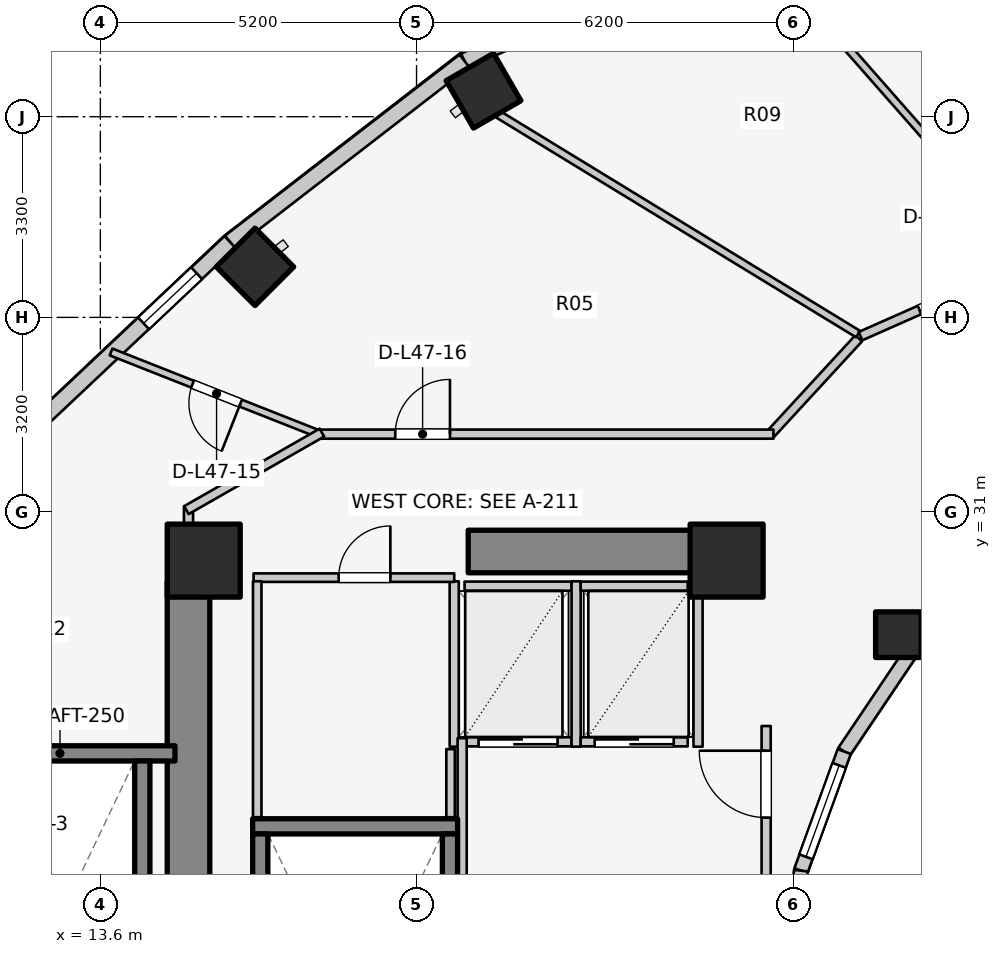
"""IFC4 building model, lengths in metres.
Left out: names, types, materials, properties, quantities, classifications, styles, units other than length and angle.
Written with IfcOpenShell. Run it as: python <this file> out.ifc"""

import sys

from ifc_helpers import new_model, si_unit, direction, frame, frame_2d, origin, origin_2d, place, context, subcontext, project, spatial, rectangle, extrude, element, fill, save


model = new_model("IFC4")
c1 = context("Model", 3, precision=1e-05, world=origin(), true_north=direction((0.0, 1.0)))
c2 = subcontext(c1, "Body", "Model", "MODEL_VIEW")
j1 = project(units=[si_unit("LENGTHUNIT", "METRE"), si_unit("PLANEANGLEUNIT", "RADIAN")], contexts=[c1])
p1 = place(None, origin())
s1 = spatial("IfcSite", under=j1, at=p1, CompositionType="ELEMENT")
p2 = place(p1, origin())
s2 = spatial("IfcBuilding", under=s1, at=p2, CompositionType="ELEMENT")
p3 = place(p2, frame((0.0, 0.0, 156.0)))
s3 = spatial("IfcBuildingStorey", under=s2, at=p3, CompositionType="ELEMENT", Elevation=156.0)
p4 = place(p3, frame((15.05, 17.05, 0.0), z_axis=(0.0, 0.0, 1.0), x_axis=(0.0, 1.0, 0.0)))
e1 = element("IfcWall", 1, at=p4, inside=s3, PredefinedType="SHEAR", context=c2, shape_type="SweptSolid", body=[
    extrude(rectangle(XDim=12.8, YDim=0.7, at=frame_2d((6.4, 0.0))), origin(), (0.0, 0.0, 1.0), 3.1),
])
p5 = place(p3, frame((19.65, 30.35, 0.0), z_axis=(0.0, 0.0, 1.0), x_axis=(1.0, 0.0, 0.0)))
e2 = element("IfcWall", 2, at=p5, inside=s3, PredefinedType="SHEAR", context=c2, shape_type="SweptSolid", body=[
    extrude(rectangle(XDim=4.5, YDim=0.7, at=frame_2d((2.25, 0.0))), origin(), (0.0, 0.0, 1.0), 3.1),
])
p6 = place(p3, frame((16.105, 25.83, 0.0), z_axis=(0.0, 0.0, 1.0), x_axis=(1.0, 0.0, 0.0)))
e3 = element("IfcWall", 3, at=p6, inside=s3, PredefinedType="SOLIDWALL", context=c2, shape_type="SweptSolid", body=[
    extrude(rectangle(XDim=3.37, YDim=0.25, at=frame_2d((1.685, 0.0))), origin(), (0.0, 0.0, 1.0), 3.1),
])
for number, where, z_axis, x_axis in (
    (4, (16.23, 17.895, 0.0), (0.0, 0.0, 1.0), (0.0, 1.0, 0.0)),
    (5, (19.35, 17.895, 0.0), (0.0, 0.0, 1.0), (0.0, 1.0, 0.0)),
):
    element("IfcWall", number, at=place(p3, frame(where, z_axis=z_axis, x_axis=x_axis)), inside=s3, PredefinedType="SOLIDWALL", context=c2, shape_type="SweptSolid", body=[
        extrude(rectangle(XDim=7.81, YDim=0.25, at=frame_2d((3.905, 0.0))), origin(), (0.0, 0.0, 1.0), 3.1),
    ])
p7 = place(p3, frame((11.045, 27.03, 0.0), z_axis=(0.0, 0.0, 1.0), x_axis=(1.0, 0.0, 0.0)))
e6 = element("IfcWall", 6, at=p7, inside=s3, PredefinedType="SOLIDWALL", context=c2, shape_type="SweptSolid", body=[
    extrude(rectangle(XDim=3.782, YDim=0.25, at=frame_2d((1.891, 0.0))), origin(), (0.0, 0.0, 1.0), 3.1),
])
p8 = place(p3, frame((14.29, 19.095, 0.0), z_axis=(0.0, 0.0, 1.0), x_axis=(0.0, 1.0, 0.0)))
e7 = element("IfcWall", 7, at=p8, inside=s3, PredefinedType="SOLIDWALL", context=c2, shape_type="SweptSolid", body=[
    extrude(rectangle(XDim=7.81, YDim=0.25, at=frame_2d((3.905, 0.0))), origin(), (0.0, 0.0, 1.0), 3.1),
])
for number, where, z_axis, x_axis in (
    (8, (23.9, 30.2, 0.0), (0.0, 0.0, 1.0), (1.0, 0.0, 0.0)),
    (9, (15.3, 30.2, 0.0), (0.0, 0.0, 1.0), (1.0, 0.0, 0.0)),
):
    element("IfcColumn", number, at=place(p3, frame(where, z_axis=z_axis, x_axis=x_axis)), inside=s3, PredefinedType="COLUMN", context=c2, shape_type="SweptSolid", body=[
        extrude(rectangle(XDim=1.2, YDim=1.2, at=origin_2d()), origin(), (0.0, 0.0, 1.0), 3.1),
    ])
p9 = place(p3, frame((19.902, 37.928, 0.0), z_axis=(0.0, 0.0, 1.0), x_axis=(-0.5, 0.866025403784, 0.0)))
e10 = element("IfcColumn", 10, at=p9, inside=s3, PredefinedType="COLUMN", context=c2, shape_type="SweptSolid", body=[
    extrude(rectangle(XDim=0.9, YDim=0.9, at=origin_2d()), origin(), (0.0, 0.0, 1.0), 3.1),
])
p10 = place(p3, frame((26.725, 28.982, 0.0), z_axis=(0.0, 0.0, 1.0), x_axis=(1.0, 0.0, 0.0)))
e11 = element("IfcColumn", 11, at=p10, inside=s3, PredefinedType="COLUMN", context=c2, shape_type="SweptSolid", body=[
    extrude(rectangle(XDim=0.75, YDim=0.75, at=origin_2d()), origin(), (0.0, 0.0, 1.0), 3.1),
])
p11 = place(p3, frame((16.143, 35.031, 0.0), z_axis=(0.0, 0.0, 1.0), x_axis=(-0.707106781187, 0.707106781187, 0.0)))
e12 = element("IfcColumn", 12, at=p11, inside=s3, PredefinedType="COLUMN", context=c2, shape_type="SweptSolid", body=[
    extrude(rectangle(XDim=0.9, YDim=0.9, at=origin_2d()), origin(), (0.0, 0.0, 1.0), 3.1),
])
p12 = place(p3, frame((28.44, 30.032, 0.0), z_axis=(0.0, 0.0, 1.0), x_axis=(-0.752576694707, -0.658504607869, 0.0)))
e13 = element("IfcWall", 13, at=p12, inside=s3, PredefinedType="STANDARD", context=c2, shape_type="SweptSolid", body=[
    extrude(rectangle(XDim=1.959, YDim=0.23, at=frame_2d((0.98, 0.0))), origin(), (0.0, 0.0, 1.0), 2.16),
])
p13 = place(p3, frame((26.965, 28.742, 0.0), z_axis=(0.0, 0.0, 1.0), x_axis=(-0.558197800898, -0.829707909492, 0.0)))
e14 = element("IfcWall", 14, at=p13, inside=s3, PredefinedType="STANDARD", context=c2, shape_type="SweptSolid", body=[
    extrude(rectangle(XDim=2.027, YDim=0.23, at=frame_2d((1.013, 0.0))), origin(), (0.0, 0.0, 1.0), 2.16),
])
p14 = place(p3, frame((25.834, 27.06, 0.0), z_axis=(0.0, 0.0, 1.0), x_axis=(-0.341423187295, -0.93990968033, 0.0)))
e15 = element("IfcWall", 15, at=p14, inside=s3, PredefinedType="STANDARD", context=c2, shape_type="SweptSolid", body=[
    extrude(rectangle(XDim=2.084, YDim=0.23, at=frame_2d((1.042, 0.0))), origin(), (0.0, 0.0, 1.0), 2.84),
])
p15 = place(p14, frame((0.242, 0.0, 0.85)))
e16 = element("IfcOpeningElement", 16, at=p15, cuts=e15, PredefinedType="OPENING", context=c2, shape_type="SweptSolid", body=[
    extrude(rectangle(XDim=1.6, YDim=1.65, at=frame_2d((0.8, 0.825))), frame((0.0, 0.125, 0.0), z_axis=(0.0, -1.0, 0.0), x_axis=(1.0, 0.0, 0.0)), (0.0, 0.0, 1.0), 0.25),
])
p16 = place(p3, frame((25.123, 25.102, 0.0), z_axis=(0.0, 0.0, 1.0), x_axis=(-0.114711713601, -0.993398823617, 0.0)))
e17 = element("IfcWall", 17, at=p16, inside=s3, PredefinedType="STANDARD", context=c2, shape_type="SweptSolid", body=[
    extrude(rectangle(XDim=2.115, YDim=0.23, at=frame_2d((1.058, 0.0))), origin(), (0.0, 0.0, 1.0), 2.84),
])
p17 = place(p3, frame((24.635, 40.685, 0.0), z_axis=(0.0, 0.0, 1.0), x_axis=(-0.912353637112, -0.409403029847, 0.0)))
e18 = element("IfcWall", 18, at=p17, inside=s3, PredefinedType="STANDARD", context=c2, shape_type="SweptSolid", body=[
    extrude(rectangle(XDim=5.533, YDim=0.26, at=frame_2d((2.766, 0.0))), origin(), (0.0, 0.0, 1.0), 2.85),
])
p18 = place(p17, frame((1.566, 0.0, 0.75)))
e19 = element("IfcOpeningElement", 19, at=p18, cuts=e18, PredefinedType="OPENING", context=c2, shape_type="SweptSolid", body=[
    extrude(rectangle(XDim=2.4, YDim=1.7, at=frame_2d((1.2, 0.85))), frame((0.0, 0.14, 0.0), z_axis=(0.0, -1.0, 0.0), x_axis=(1.0, 0.0, 0.0)), (0.0, 0.0, 1.0), 0.28),
])
p19 = place(p3, frame((19.587, 38.419, 0.0), z_axis=(0.0, 0.0, 1.0), x_axis=(-0.791460185804, -0.611220724687, 0.0)))
e20 = element("IfcWall", 20, at=p19, inside=s3, PredefinedType="STANDARD", context=c2, shape_type="SweptSolid", body=[
    extrude(rectangle(XDim=4.872, YDim=0.26, at=frame_2d((2.436, 0.0))), origin(), (0.0, 0.0, 1.0), 2.85),
])
p20 = place(p3, frame((15.731, 35.441, 0.0), z_axis=(0.0, 0.0, 1.0), x_axis=(-0.727667301037, -0.68593024354, 0.0)))
e21 = element("IfcWall", 21, at=p20, inside=s3, PredefinedType="STANDARD", context=c2, shape_type="SweptSolid", body=[
    extrude(rectangle(XDim=4.604, YDim=0.26, at=frame_2d((2.302, 0.0))), origin(), (0.0, 0.0, 1.0), 2.85),
])
p21 = place(p20, frame((0.751, 0.0, 0.75)))
e22 = element("IfcOpeningElement", 22, at=p21, cuts=e21, PredefinedType="OPENING", context=c2, shape_type="SweptSolid", body=[
    extrude(rectangle(XDim=1.2, YDim=1.5, at=frame_2d((0.6, 0.75))), frame((0.0, 0.14, 0.0), z_axis=(0.0, -1.0, 0.0), x_axis=(1.0, 0.0, 0.0)), (0.0, 0.0, 1.0), 0.28),
])
p22 = place(p3, frame((19.59, 27.22, 0.0), z_axis=(0.0, 0.0, 1.0), x_axis=(1.0, 0.0, 0.0)))
e23 = element("IfcWall", 23, at=p22, inside=s3, PredefinedType="SOLIDWALL", context=c2, shape_type="SweptSolid", body=[
    extrude(rectangle(XDim=1.76, YDim=0.15, at=frame_2d((0.88, 0.0))), origin(), (0.0, 0.0, 1.0), 2.855),
])
p23 = place(p22, frame((0.23, 0.0, 0.0)))
e24 = element("IfcOpeningElement", 24, at=p23, cuts=e23, PredefinedType="OPENING", context=c2, shape_type="SweptSolid", body=[
    extrude(rectangle(XDim=1.3, YDim=2.1, at=frame_2d((0.65, 1.05))), frame((0.0, 0.085, 0.0), z_axis=(0.0, -1.0, 0.0), x_axis=(1.0, 0.0, 0.0)), (0.0, 0.0, 1.0), 0.17),
])
p24 = place(p3, frame((19.59, 29.78, 0.0), z_axis=(0.0, 0.0, 1.0), x_axis=(1.0, 0.0, 0.0)))
e25 = element("IfcWall", 25, at=p24, inside=s3, PredefinedType="SOLIDWALL", context=c2, shape_type="SweptSolid", body=[
    extrude(rectangle(XDim=1.76, YDim=0.15, at=frame_2d((0.88, 0.0))), origin(), (0.0, 0.0, 1.0), 2.855),
])
for number, where, z_axis, x_axis in (
    (26, (19.42, 27.14, 0.0), (0.0, 0.0, 1.0), (0.0, 1.0, 0.0)),
    (27, (21.425, 27.14, 0.0), (0.0, 0.0, 1.0), (0.0, 1.0, 0.0)),
):
    element("IfcWall", number, at=place(p3, frame(where, z_axis=z_axis, x_axis=x_axis)), inside=s3, PredefinedType="SOLIDWALL", context=c2, shape_type="SweptSolid", body=[
        extrude(rectangle(XDim=2.72, YDim=0.15, at=frame_2d((1.36, 0.0))), origin(), (0.0, 0.0, 1.0), 2.855),
    ])
p25 = place(p3, frame((21.5, 27.22, 0.0), z_axis=(0.0, 0.0, 1.0), x_axis=(1.0, 0.0, 0.0)))
e28 = element("IfcWall", 28, at=p25, inside=s3, PredefinedType="SOLIDWALL", context=c2, shape_type="SweptSolid", body=[
    extrude(rectangle(XDim=1.76, YDim=0.15, at=frame_2d((0.88, 0.0))), origin(), (0.0, 0.0, 1.0), 2.855),
])
p26 = place(p25, frame((0.23, 0.0, 0.0)))
e29 = element("IfcOpeningElement", 29, at=p26, cuts=e28, PredefinedType="OPENING", context=c2, shape_type="SweptSolid", body=[
    extrude(rectangle(XDim=1.3, YDim=2.1, at=frame_2d((0.65, 1.05))), frame((0.0, 0.085, 0.0), z_axis=(0.0, -1.0, 0.0), x_axis=(1.0, 0.0, 0.0)), (0.0, 0.0, 1.0), 0.17),
])
p27 = place(p3, frame((21.5, 29.78, 0.0), z_axis=(0.0, 0.0, 1.0), x_axis=(1.0, 0.0, 0.0)))
e30 = element("IfcWall", 30, at=p27, inside=s3, PredefinedType="SOLIDWALL", context=c2, shape_type="SweptSolid", body=[
    extrude(rectangle(XDim=1.76, YDim=0.15, at=frame_2d((0.88, 0.0))), origin(), (0.0, 0.0, 1.0), 2.855),
])
p28 = place(p3, frame((23.43, 27.14, 0.0), z_axis=(0.0, 0.0, 1.0), x_axis=(0.0, 1.0, 0.0)))
e31 = element("IfcWall", 31, at=p28, inside=s3, PredefinedType="SOLIDWALL", context=c2, shape_type="SweptSolid", body=[
    extrude(rectangle(XDim=2.72, YDim=0.15, at=frame_2d((1.36, 0.0))), origin(), (0.0, 0.0, 1.0), 2.855),
])
p29 = place(p3, frame((19.55, 24.08, 0.0), z_axis=(0.0, 0.0, 1.0), x_axis=(0.0, 1.0, 0.0)))
e32 = element("IfcWall", 32, at=p29, inside=s3, PredefinedType="PARTITIONING", context=c2, shape_type="SweptSolid", body=[
    extrude(rectangle(XDim=3.2, YDim=0.15, at=frame_2d((1.6, 0.0))), origin(), (0.0, 0.0, 1.0), 2.855),
])
p30 = place(p3, frame((24.55, 24.08, 0.0), z_axis=(0.0, 0.0, 1.0), x_axis=(0.0, 1.0, 0.0)))
e33 = element("IfcWall", 33, at=p30, inside=s3, PredefinedType="PARTITIONING", context=c2, shape_type="SweptSolid", body=[
    extrude(rectangle(XDim=3.4, YDim=0.15, at=frame_2d((1.7, 0.0))), origin(), (0.0, 0.0, 1.0), 2.855),
])
p31 = place(p30, frame((1.894, 0.0, 0.0)))
e34 = element("IfcOpeningElement", 34, at=p31, cuts=e33, PredefinedType="OPENING", context=c2, shape_type="SweptSolid", body=[
    extrude(rectangle(XDim=1.1, YDim=2.1, at=frame_2d((0.55, 1.05))), frame((0.0, 0.085, 0.0), z_axis=(0.0, -1.0, 0.0), x_axis=(1.0, 0.0, 0.0)), (0.0, 0.0, 1.0), 0.17),
])
p32 = place(p3, frame((16.12, 29.92, 0.0), z_axis=(0.0, 0.0, 1.0), x_axis=(1.0, 0.0, 0.0)))
e35 = element("IfcWall", 35, at=p32, inside=s3, PredefinedType="PLUMBINGWALL", context=c2, shape_type="SweptSolid", body=[
    extrude(rectangle(XDim=3.3, YDim=0.14, at=frame_2d((1.65, 0.0))), origin(), (0.0, 0.0, 1.0), 2.855),
])
p33 = place(p32, frame((1.399, 0.0, 0.0)))
e36 = element("IfcOpeningElement", 36, at=p33, cuts=e35, PredefinedType="OPENING", context=c2, shape_type="SweptSolid", body=[
    extrude(rectangle(XDim=0.85, YDim=2.05, at=frame_2d((0.425, 1.025))), frame((0.0, 0.08, 0.0), z_axis=(0.0, -1.0, 0.0), x_axis=(1.0, 0.0, 0.0)), (0.0, 0.0, 1.0), 0.16),
])
p34 = place(p3, frame((16.18, 25.98, 0.0), z_axis=(0.0, 0.0, 1.0), x_axis=(0.0, 1.0, 0.0)))
e37 = element("IfcWall", 37, at=p34, inside=s3, PredefinedType="PLUMBINGWALL", context=c2, shape_type="SweptSolid", body=[
    extrude(rectangle(XDim=3.88, YDim=0.14, at=frame_2d((1.94, 0.0))), origin(), (0.0, 0.0, 1.0), 2.855),
])
p35 = place(p3, frame((19.36, 25.98, 0.0), z_axis=(0.0, 0.0, 1.0), x_axis=(0.0, 1.0, 0.0)))
e38 = element("IfcWall", 38, at=p35, inside=s3, PredefinedType="PLUMBINGWALL", context=c2, shape_type="SweptSolid", body=[
    extrude(rectangle(XDim=1.12, YDim=0.14, at=frame_2d((0.56, 0.0))), origin(), (0.0, 0.0, 1.0), 2.855),
])
p36 = place(p3, frame((15.05, 29.8, 0.0), z_axis=(0.0, 0.0, 1.0), x_axis=(0.0, 1.0, 0.0)))
e39 = element("IfcWall", 39, at=p36, inside=s3, PredefinedType="PARTITIONING", context=c2, shape_type="SweptSolid", body=[
    extrude(rectangle(XDim=1.29, YDim=0.15, at=frame_2d((0.645, 0.0))), origin(), (0.0, 0.0, 1.0), 2.855),
])
p37 = place(p3, frame((17.247, 32.262, 0.0), z_axis=(0.0, 0.0, 1.0), x_axis=(-0.930204027108, 0.367042869367, 0.0)))
e40 = element("IfcWall", 40, at=p37, inside=s3, PredefinedType="MOVABLE", context=c2, shape_type="SweptSolid", body=[
    extrude(rectangle(XDim=3.731, YDim=0.12, at=frame_2d((1.865, 0.0))), origin(), (0.0, 0.0, 1.0), 2.22),
])
p38 = place(p37, frame((1.44, 0.0, 0.0)))
e41 = element("IfcOpeningElement", 41, at=p38, cuts=e40, PredefinedType="OPENING", context=c2, shape_type="SweptSolid", body=[
    extrude(rectangle(XDim=0.85, YDim=2.05, at=frame_2d((0.425, 1.025))), frame((0.0, 0.07, 0.0), z_axis=(0.0, -1.0, 0.0), x_axis=(1.0, 0.0, 0.0)), (0.0, 0.0, 1.0), 0.14),
])
p39 = place(p3, frame((26.072, 33.856, 0.0), z_axis=(0.0, 0.0, 1.0), x_axis=(-0.677579737957, -0.735449317567, 0.0)))
e42 = element("IfcWall", 42, at=p39, inside=s3, PredefinedType="PARTITIONING", context=c2, shape_type="SweptSolid", body=[
    extrude(rectangle(XDim=2.173, YDim=0.15, at=frame_2d((1.086, 0.0))), origin(), (0.0, 0.0, 1.0), 2.299),
])
p40 = place(p3, frame((17.15, 32.28, 0.0), z_axis=(0.0, 0.0, 1.0), x_axis=(1.0, 0.0, 0.0)))
e43 = element("IfcWall", 43, at=p40, inside=s3, PredefinedType="PARTITIONING", context=c2, shape_type="SweptSolid", body=[
    extrude(rectangle(XDim=7.52, YDim=0.15, at=frame_2d((3.76, 0.0))), origin(), (0.0, 0.0, 1.0), 2.299),
])
p41 = place(p40, frame((1.3, 0.0, 0.0)))
e44 = element("IfcOpeningElement", 44, at=p41, cuts=e43, PredefinedType="OPENING", context=c2, shape_type="SweptSolid", body=[
    extrude(rectangle(XDim=0.9, YDim=2.1, at=frame_2d((0.45, 1.05))), frame((0.0, 0.085, 0.0), z_axis=(0.0, -1.0, 0.0), x_axis=(1.0, 0.0, 0.0)), (0.0, 0.0, 1.0), 0.17),
])
p42 = place(p3, frame((17.243, 32.305, 0.0), z_axis=(0.0, 0.0, 1.0), x_axis=(-0.867991349648, -0.496579315857, 0.0)))
e45 = element("IfcWall", 45, at=p42, inside=s3, PredefinedType="PARTITIONING", context=c2, shape_type="SweptSolid", body=[
    extrude(rectangle(XDim=2.567, YDim=0.15, at=frame_2d((1.283, 0.0))), origin(), (0.0, 0.0, 1.0), 2.22),
])
p43 = place(p3, frame((28.914, 35.195, 0.0), z_axis=(0.0, 0.0, 1.0), x_axis=(-0.660581320981, 0.750754499401, 0.0)))
e46 = element("IfcWall", 46, at=p43, inside=s3, PredefinedType="PARTITIONING", context=c2, shape_type="SweptSolid", body=[
    extrude(rectangle(XDim=6.027, YDim=0.125, at=frame_2d((3.013, 0.0))), origin(), (0.0, 0.0, 1.0), 2.299),
])
p44 = place(p3, frame((26.062, 33.925, 0.0), z_axis=(0.0, 0.0, 1.0), x_axis=(-0.853440334679, 0.521190555501, 0.0)))
e47 = element("IfcWall", 47, at=p44, inside=s3, PredefinedType="PARTITIONING", context=c2, shape_type="SweptSolid", body=[
    extrude(rectangle(XDim=6.966, YDim=0.125, at=frame_2d((3.483, 0.0))), origin(), (0.0, 0.0, 1.0), 2.299),
])
p45 = place(p3, frame((28.958, 35.156, 0.0), z_axis=(0.0, 0.0, 1.0), x_axis=(-0.914519212393, -0.40454247016, 0.0)))
e48 = element("IfcWall", 48, at=p45, inside=s3, PredefinedType="PARTITIONING", context=c2, shape_type="SweptSolid", body=[
    extrude(rectangle(XDim=3.124, YDim=0.15, at=frame_2d((1.562, 0.0))), origin(), (0.0, 0.0, 1.0), 2.299),
])
p46 = place(p45, frame((1.062, 0.0, 0.0)))
e49 = element("IfcOpeningElement", 49, at=p46, cuts=e48, PredefinedType="OPENING", context=c2, shape_type="SweptSolid", body=[
    extrude(rectangle(XDim=1.0, YDim=2.1, at=frame_2d((0.5, 1.05))), frame((0.0, 0.085, 0.0), z_axis=(0.0, -1.0, 0.0), x_axis=(1.0, 0.0, 0.0)), (0.0, 0.0, 1.0), 0.17),
])
p47 = place(p15, origin())
e50 = element("IfcWindow", 50, at=p47, inside=s3, PartitioningType="SINGLE_PANEL", PredefinedType="WINDOW", context=c2, shape_type="SweptSolid", body=[
    extrude(rectangle(XDim=1.6, YDim=1.65, at=frame_2d((0.8, 0.825))), frame((0.0, 0.03, 0.0), z_axis=(0.0, -1.0, 0.0), x_axis=(1.0, 0.0, 0.0)), (0.0, 0.0, 1.0), 0.06),
])
fill(e16, e50)
p48 = place(p21, origin())
e51 = element("IfcWindow", 51, at=p48, inside=s3, PartitioningType="SINGLE_PANEL", PredefinedType="WINDOW", context=c2, shape_type="SweptSolid", body=[
    extrude(rectangle(XDim=1.2, YDim=1.5, at=frame_2d((0.6, 0.75))), frame((0.0, 0.03, 0.0), z_axis=(0.0, -1.0, 0.0), x_axis=(1.0, 0.0, 0.0)), (0.0, 0.0, 1.0), 0.06),
])
fill(e22, e51)
p49 = place(p23, origin())
e52 = element("IfcDoor", 52, at=p49, inside=s3, OperationType="DOUBLE_DOOR_SLIDING", PredefinedType="DOOR", context=c2, shape_type="SweptSolid", body=[
    extrude(rectangle(XDim=1.3, YDim=2.1, at=frame_2d((0.65, 1.05))), frame((0.0, 0.025, 0.0), z_axis=(0.0, -1.0, 0.0), x_axis=(1.0, 0.0, 0.0)), (0.0, 0.0, 1.0), 0.05),
])
fill(e24, e52)
p50 = place(p26, origin())
e53 = element("IfcDoor", 53, at=p50, inside=s3, OperationType="DOUBLE_DOOR_SLIDING", PredefinedType="DOOR", context=c2, shape_type="SweptSolid", body=[
    extrude(rectangle(XDim=1.3, YDim=2.1, at=frame_2d((0.65, 1.05))), frame((0.0, 0.025, 0.0), z_axis=(0.0, -1.0, 0.0), x_axis=(1.0, 0.0, 0.0)), (0.0, 0.0, 1.0), 0.05),
])
fill(e29, e53)
p51 = place(p31, origin())
e54 = element("IfcDoor", 54, at=p51, inside=s3, OperationType="SINGLE_SWING_RIGHT", PredefinedType="DOOR", context=c2, shape_type="SweptSolid", body=[
    extrude(rectangle(XDim=1.1, YDim=2.1, at=frame_2d((0.55, 1.05))), frame((0.0, 0.025, 0.0), z_axis=(0.0, -1.0, 0.0), x_axis=(1.0, 0.0, 0.0)), (0.0, 0.0, 1.0), 0.05),
])
fill(e34, e54)
p52 = place(p33, origin())
e55 = element("IfcDoor", 55, at=p52, inside=s3, OperationType="SINGLE_SWING_RIGHT", PredefinedType="DOOR", context=c2, shape_type="SweptSolid", body=[
    extrude(rectangle(XDim=0.85, YDim=2.05, at=frame_2d((0.425, 1.025))), frame((0.0, 0.025, 0.0), z_axis=(0.0, -1.0, 0.0), x_axis=(1.0, 0.0, 0.0)), (0.0, 0.0, 1.0), 0.05),
])
fill(e36, e55)
p53 = place(p38, origin())
e56 = element("IfcDoor", 56, at=p53, inside=s3, OperationType="SINGLE_SWING_LEFT", PredefinedType="DOOR", context=c2, shape_type="SweptSolid", body=[
    extrude(rectangle(XDim=0.85, YDim=2.05, at=frame_2d((0.425, 1.025))), frame((0.0, 0.025, 0.0), z_axis=(0.0, -1.0, 0.0), x_axis=(1.0, 0.0, 0.0)), (0.0, 0.0, 1.0), 0.05),
])
fill(e41, e56)
p54 = place(p41, origin())
e57 = element("IfcDoor", 57, at=p54, inside=s3, OperationType="SINGLE_SWING_RIGHT", PredefinedType="DOOR", context=c2, shape_type="SweptSolid", body=[
    extrude(rectangle(XDim=0.9, YDim=2.1, at=frame_2d((0.45, 1.05))), frame((0.0, 0.025, 0.0), z_axis=(0.0, -1.0, 0.0), x_axis=(1.0, 0.0, 0.0)), (0.0, 0.0, 1.0), 0.05),
])
fill(e44, e57)
p55 = place(p46, origin())
e58 = element("IfcDoor", 58, at=p55, inside=s3, OperationType="SINGLE_SWING_RIGHT", PredefinedType="DOOR", context=c2, shape_type="SweptSolid", body=[
    extrude(rectangle(XDim=1.0, YDim=2.1, at=frame_2d((0.5, 1.05))), frame((0.0, 0.025, 0.0), z_axis=(0.0, -1.0, 0.0), x_axis=(1.0, 0.0, 0.0)), (0.0, 0.0, 1.0), 0.05),
])
fill(e49, e58)
save(model, sys.argv[1])
